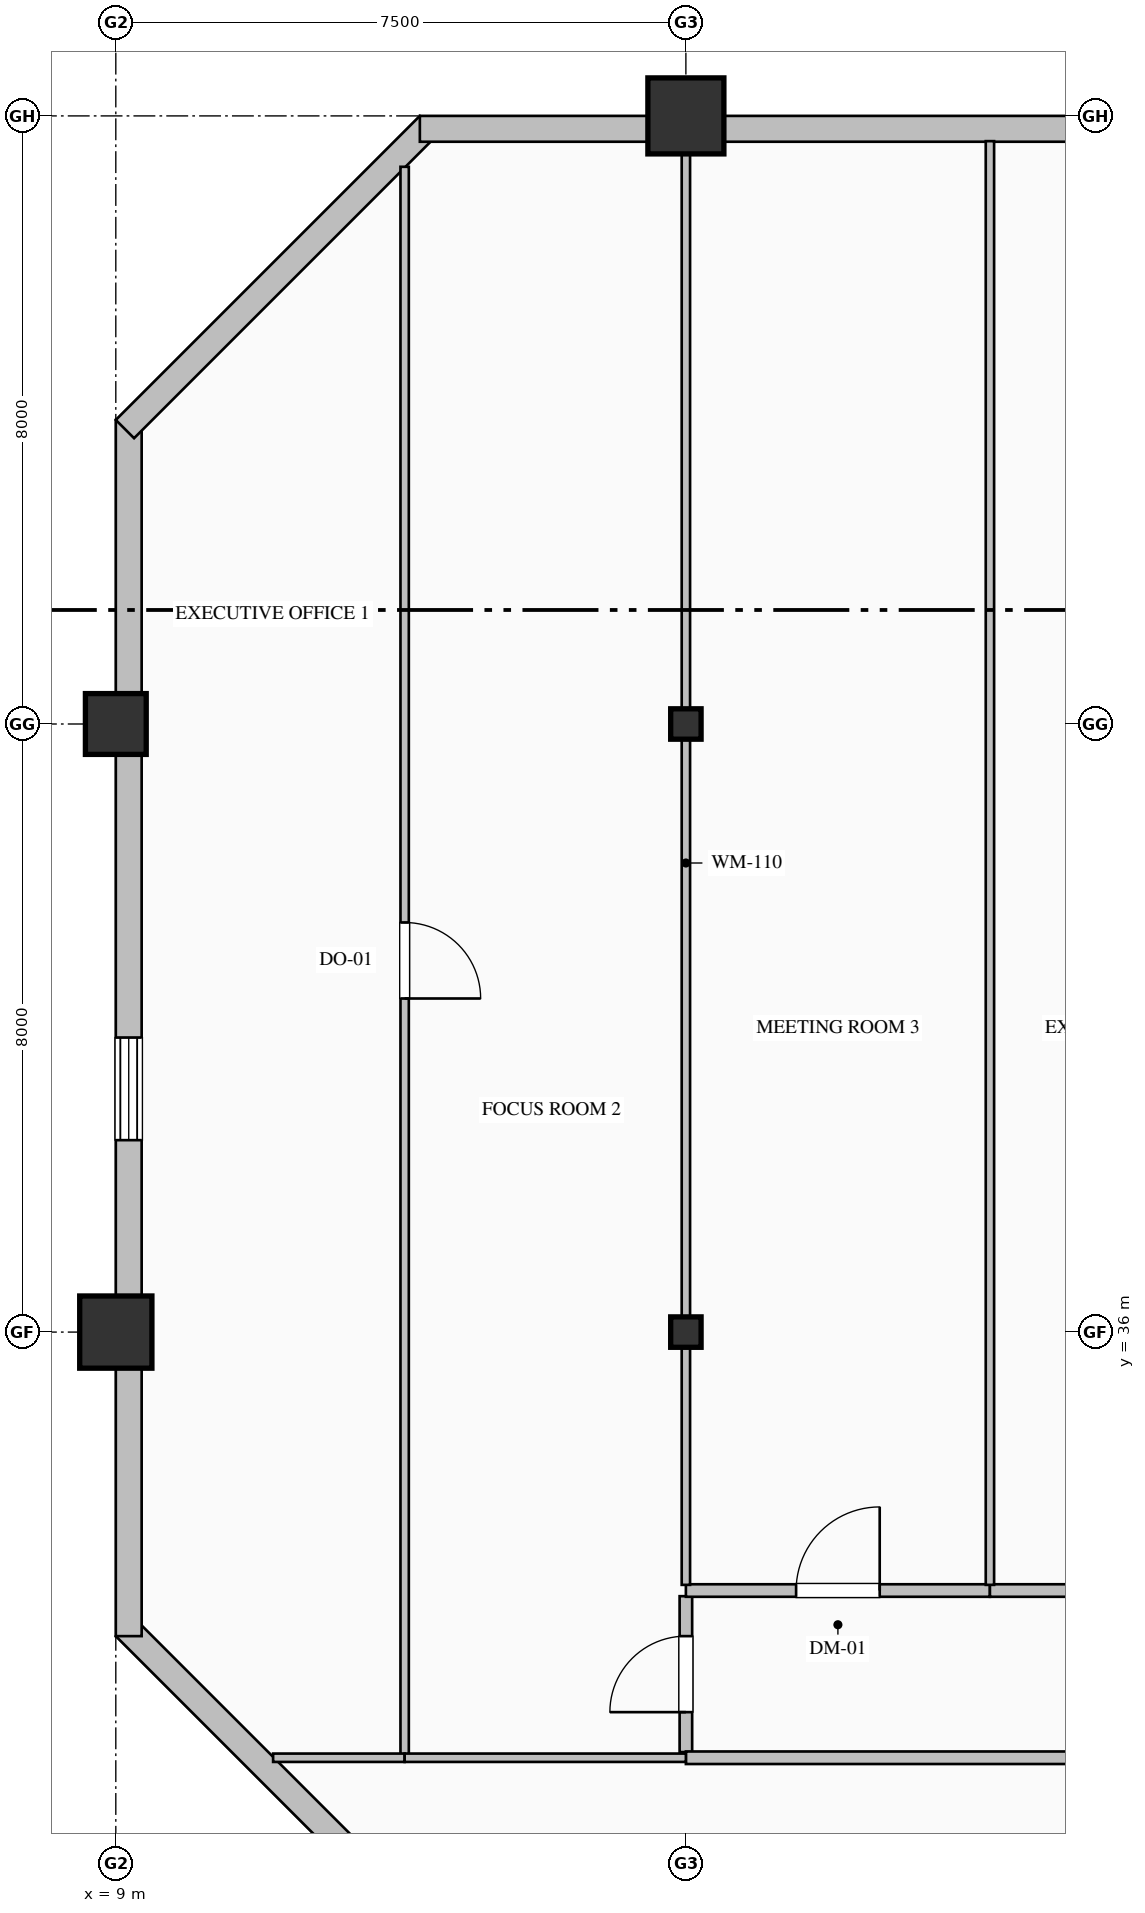
"""IFC4 building model, lengths in metres.
Left out: names, types, materials, properties, quantities, classifications, styles, units other than length and angle.
Written with IfcOpenShell. Run it as: python <this file> out.ifc"""

import sys

from ifc_helpers import new_model, si_unit, direction, frame, frame_2d, origin, origin_2d, place, context, subcontext, project, spatial, rectangle, hollow_rectangle, hollow_circle, i_section, extrude, element, fill, save


model = new_model("IFC4")
c1 = context("Model", 3, precision=1e-05, world=origin(), true_north=direction((0.0, 1.0)))
c2 = subcontext(c1, "Body", "Model", "MODEL_VIEW")
j1 = project(units=[si_unit("LENGTHUNIT", "METRE"), si_unit("PLANEANGLEUNIT", "RADIAN")], contexts=[c1])
p1 = place(None, origin())
s1 = spatial("IfcSite", under=j1, at=p1, CompositionType="ELEMENT")
p2 = place(p1, origin())
s2 = spatial("IfcBuilding", under=s1, at=p2, CompositionType="ELEMENT")
p3 = place(p2, frame((0.0, 0.0, 213.8)))
s3 = spatial("IfcBuildingStorey", under=s2, at=p3, CompositionType="ELEMENT", Elevation=213.8)
p4 = place(p3, frame((9.0, 36.0, 0.0), z_axis=(0.0, 0.0, 1.0), x_axis=(1.0, 0.0, 0.0)))
e1 = element("IfcColumn", 1, at=p4, inside=s3, PredefinedType="COLUMN", context=c2, shape_type="SweptSolid", body=[
    extrude(hollow_rectangle(XDim=0.95, YDim=0.95, WallThickness=0.036, at=origin_2d()), origin(), (0.0, 0.0, 1.0), 4.0),
])
p5 = place(p3, frame((9.0, 44.0, 0.0), z_axis=(0.0, 0.0, 1.0), x_axis=(1.0, 0.0, 0.0)))
e2 = element("IfcColumn", 2, at=p5, inside=s3, PredefinedType="COLUMN", context=c2, shape_type="SweptSolid", body=[
    extrude(hollow_rectangle(XDim=0.8, YDim=0.8, WallThickness=0.032, at=origin_2d()), origin(), (0.0, 0.0, 1.0), 4.0),
])
for number, where, z_axis, x_axis in (
    (3, (16.5, 36.0, 0.0), (0.0, 0.0, 1.0), (1.0, 0.0, 0.0)),
    (4, (16.5, 44.0, 0.0), (0.0, 0.0, 1.0), (1.0, 0.0, 0.0)),
):
    element("IfcColumn", number, at=place(p3, frame(where, z_axis=z_axis, x_axis=x_axis)), inside=s3, PredefinedType="COLUMN", context=c2, shape_type="SweptSolid", body=[
        extrude(i_section(OverallWidth=0.4, OverallDepth=0.4, WebThickness=0.013, FlangeThickness=0.021, FilletRadius=0.022, at=origin_2d()), origin(), (0.0, 0.0, 1.0), 4.0),
    ])
p6 = place(p3, frame((16.5, 52.0, 0.0), z_axis=(0.0, 0.0, 1.0), x_axis=(1.0, 0.0, 0.0)))
e5 = element("IfcColumn", 5, at=p6, inside=s3, PredefinedType="COLUMN", context=c2, shape_type="SweptSolid", body=[
    extrude(hollow_circle(Radius=0.5, WallThickness=0.036, at=origin_2d()), origin(), (0.0, 0.0, 1.0), 4.0),
])
p7 = place(p3, frame((13.12, 28.12, 0.0), z_axis=(0.0, 0.0, 1.0), x_axis=(-0.707106781187, 0.707106781187, 0.0)))
e6 = element("IfcWall", 6, at=p7, inside=s3, PredefinedType="SOLIDWALL", context=c2, shape_type="SweptSolid", body=[
    extrude(rectangle(XDim=5.657, YDim=0.34, at=frame_2d((2.828, 0.0))), origin(), (0.0, 0.0, 1.0), 3.775),
])
p8 = place(p3, frame((9.17, 32.0, 0.0), z_axis=(0.0, 0.0, 1.0), x_axis=(0.0, 1.0, 0.0)))
e7 = element("IfcWall", 7, at=p8, inside=s3, PredefinedType="SOLIDWALL", context=c2, shape_type="SweptSolid", body=[
    extrude(rectangle(XDim=16.0, YDim=0.34, at=frame_2d((8.0, 0.0))), origin(), (0.0, 0.0, 1.0), 3.325),
])
p9 = place(p8, frame((6.525, 0.0, 0.9)))
e8 = element("IfcOpeningElement", 8, at=p9, cuts=e7, PredefinedType="OPENING", context=c2, shape_type="SweptSolid", body=[
    extrude(rectangle(XDim=1.35, YDim=1.85, at=frame_2d((0.675, 0.925))), frame((0.0, 0.18, 0.0), z_axis=(0.0, -1.0, 0.0), x_axis=(1.0, 0.0, 0.0)), (0.0, 0.0, 1.0), 0.36),
])
p10 = place(p3, frame((9.12, 47.88, 0.0), z_axis=(0.0, 0.0, 1.0), x_axis=(0.707106781187, 0.707106781187, 0.0)))
e9 = element("IfcWall", 9, at=p10, inside=s3, PredefinedType="SOLIDWALL", context=c2, shape_type="SweptSolid", body=[
    extrude(rectangle(XDim=5.657, YDim=0.34, at=frame_2d((2.828, 0.0))), origin(), (0.0, 0.0, 1.0), 3.775),
])
p11 = place(p3, frame((13.0, 51.83, 0.0), z_axis=(0.0, 0.0, 1.0), x_axis=(1.0, 0.0, 0.0)))
e10 = element("IfcWall", 10, at=p11, inside=s3, PredefinedType="SOLIDWALL", context=c2, shape_type="SweptSolid", body=[
    extrude(rectangle(XDim=27.52, YDim=0.34, at=frame_2d((13.76, 0.0))), origin(), (0.0, 0.0, 1.0), 3.325),
])
p12 = place(p11, frame((17.4, 0.0, 0.9)))
e11 = element("IfcOpeningElement", 11, at=p12, cuts=e10, PredefinedType="OPENING", context=c2, shape_type="SweptSolid", body=[
    extrude(rectangle(XDim=1.2, YDim=1.85, at=frame_2d((0.6, 0.925))), frame((0.0, 0.18, 0.0), z_axis=(0.0, -1.0, 0.0), x_axis=(1.0, 0.0, 0.0)), (0.0, 0.0, 1.0), 0.36),
])
p13 = place(p3, frame((16.5, 30.475, 0.0), z_axis=(0.0, 0.0, 1.0), x_axis=(0.0, 1.0, 0.0)))
e12 = element("IfcWall", 12, at=p13, inside=s3, PredefinedType="PARTITIONING", context=c2, shape_type="SweptSolid", body=[
    extrude(rectangle(XDim=2.051, YDim=0.165, at=frame_2d((1.025, 0.0))), origin(), (0.0, 0.0, 1.0), 3.179),
])
p14 = place(p13, frame((0.525, 0.0, 0.0)))
e13 = element("IfcOpeningElement", 13, at=p14, cuts=e12, PredefinedType="OPENING", context=c2, shape_type="SweptSolid", body=[
    extrude(rectangle(XDim=1.0, YDim=2.15, at=frame_2d((0.5, 1.075))), frame((0.0, 0.093, 0.0), z_axis=(0.0, -1.0, 0.0), x_axis=(1.0, 0.0, 0.0)), (0.0, 0.0, 1.0), 0.185),
])
p15 = place(p3, frame((16.5, 32.6, 0.0), z_axis=(0.0, 0.0, 1.0), x_axis=(1.0, 0.0, 0.0)))
e14 = element("IfcWall", 14, at=p15, inside=s3, PredefinedType="PARTITIONING", context=c2, shape_type="SweptSolid", body=[
    extrude(rectangle(XDim=4.0, YDim=0.165, at=frame_2d((2.0, 0.0))), origin(), (0.0, 0.0, 1.0), 3.775),
])
p16 = place(p15, frame((1.45, 0.0, 0.0)))
e15 = element("IfcOpeningElement", 15, at=p16, cuts=e14, PredefinedType="OPENING", context=c2, shape_type="SweptSolid", body=[
    extrude(rectangle(XDim=1.1, YDim=2.2, at=frame_2d((0.55, 1.1))), frame((0.0, 0.093, 0.0), z_axis=(0.0, -1.0, 0.0), x_axis=(1.0, 0.0, 0.0)), (0.0, 0.0, 1.0), 0.185),
])
p17 = place(p3, frame((20.5, 32.6, 0.0), z_axis=(0.0, 0.0, 1.0), x_axis=(1.0, 0.0, 0.0)))
e16 = element("IfcWall", 16, at=p17, inside=s3, PredefinedType="PARTITIONING", context=c2, shape_type="SweptSolid", body=[
    extrude(rectangle(XDim=4.0, YDim=0.165, at=frame_2d((2.0, 0.0))), origin(), (0.0, 0.0, 1.0), 3.775),
])
p18 = place(p17, frame((1.5, 0.0, 0.0)))
e17 = element("IfcOpeningElement", 17, at=p18, cuts=e16, PredefinedType="OPENING", context=c2, shape_type="SweptSolid", body=[
    extrude(rectangle(XDim=1.0, YDim=2.15, at=frame_2d((0.5, 1.075))), frame((0.0, 0.093, 0.0), z_axis=(0.0, -1.0, 0.0), x_axis=(1.0, 0.0, 0.0)), (0.0, 0.0, 1.0), 0.185),
])
p19 = place(p3, frame((37.8, 30.4, 0.0), z_axis=(0.0, 0.0, 1.0), x_axis=(-1.0, 0.0, 0.0)))
e18 = element("IfcWall", 18, at=p19, inside=s3, PredefinedType="PARTITIONING", context=c2, shape_type="SweptSolid", body=[
    extrude(rectangle(XDim=21.3, YDim=0.165, at=frame_2d((10.65, 0.0))), origin(), (0.0, 0.0, 1.0), 3.775),
])
p20 = place(p19, frame((10.15, 0.0, 0.0)))
e19 = element("IfcOpeningElement", 19, at=p20, cuts=e18, PredefinedType="OPENING", context=c2, shape_type="SweptSolid", body=[
    extrude(rectangle(XDim=1.0, YDim=2.15, at=frame_2d((0.5, 1.075))), frame((0.0, 0.093, 0.0), z_axis=(0.0, -1.0, 0.0), x_axis=(1.0, 0.0, 0.0)), (0.0, 0.0, 1.0), 0.185),
])
p21 = place(p3, frame((12.8, 51.331, 0.0), z_axis=(0.0, 0.0, 1.0), x_axis=(0.0, -1.0, 0.0)))
e20 = element("IfcWall", 20, at=p21, inside=s3, PredefinedType="MOVABLE", context=c2, shape_type="SweptSolid", body=[
    extrude(rectangle(XDim=20.884, YDim=0.11, at=frame_2d((10.442, 0.0))), origin(), (0.0, 0.0, 1.0), 3.775),
])
p22 = place(p21, frame((9.942, 0.0, 0.0)))
e21 = element("IfcOpeningElement", 21, at=p22, cuts=e20, PredefinedType="OPENING", context=c2, shape_type="SweptSolid", body=[
    extrude(rectangle(XDim=1.0, YDim=2.15, at=frame_2d((0.5, 1.075))), frame((0.0, 0.065, 0.0), z_axis=(0.0, -1.0, 0.0), x_axis=(1.0, 0.0, 0.0)), (0.0, 0.0, 1.0), 0.13),
])
p23 = place(p3, frame((12.8, 30.4, 0.0), z_axis=(0.0, 0.0, 1.0), x_axis=(-1.0, 0.0, 0.0)))
e22 = element("IfcWall", 22, at=p23, inside=s3, PredefinedType="MOVABLE", context=c2, shape_type="SweptSolid", body=[
    extrude(rectangle(XDim=1.73, YDim=0.11, at=frame_2d((0.865, 0.0))), origin(), (0.0, 0.0, 1.0), 3.775),
])
p24 = place(p3, frame((16.5, 51.668, 0.0), z_axis=(0.0, 0.0, 1.0), x_axis=(0.0, -1.0, 0.0)))
e23 = element("IfcWall", 23, at=p24, inside=s3, PredefinedType="MOVABLE", context=c2, shape_type="SweptSolid", body=[
    extrude(rectangle(XDim=18.993, YDim=0.11, at=frame_2d((9.497, 0.0))), origin(), (0.0, 0.0, 1.0), 3.179),
])
p25 = place(p3, frame((16.5, 30.4, 0.0), z_axis=(0.0, 0.0, 1.0), x_axis=(-1.0, 0.0, 0.0)))
e24 = element("IfcWall", 24, at=p25, inside=s3, PredefinedType="MOVABLE", context=c2, shape_type="SweptSolid", body=[
    extrude(rectangle(XDim=3.7, YDim=0.11, at=frame_2d((1.85, 0.0))), origin(), (0.0, 0.0, 1.0), 3.775),
])
p26 = place(p3, frame((20.5, 51.668, 0.0), z_axis=(0.0, 0.0, 1.0), x_axis=(0.0, -1.0, 0.0)))
e25 = element("IfcWall", 25, at=p26, inside=s3, PredefinedType="MOVABLE", context=c2, shape_type="SweptSolid", body=[
    extrude(rectangle(XDim=18.993, YDim=0.11, at=frame_2d((9.497, 0.0))), origin(), (0.0, 0.0, 1.0), 3.775),
])
p27 = place(p9, origin())
e26 = element("IfcWindow", 26, at=p27, inside=s3, PartitioningType="DOUBLE_PANEL_VERTICAL", PredefinedType="WINDOW", context=c2, shape_type="SweptSolid", body=[
    extrude(rectangle(XDim=1.35, YDim=1.85, at=frame_2d((0.675, 0.925))), frame((0.0, 0.15, 0.0), z_axis=(0.0, -1.0, 0.0), x_axis=(1.0, 0.0, 0.0)), (0.0, 0.0, 1.0), 0.06),
])
fill(e8, e26)
p28 = place(p22, origin())
e27 = element("IfcDoor", 27, at=p28, inside=s3, OperationType="SINGLE_SWING_RIGHT", PredefinedType="DOOR", context=c2, shape_type="SweptSolid", body=[
    extrude(rectangle(XDim=1.0, YDim=2.15, at=frame_2d((0.5, 1.075))), frame((0.0, 0.025, 0.0), z_axis=(0.0, -1.0, 0.0), x_axis=(1.0, 0.0, 0.0)), (0.0, 0.0, 1.0), 0.05),
])
fill(e21, e27)
p29 = place(p14, origin())
e28 = element("IfcDoor", 28, at=p29, inside=s3, OperationType="SINGLE_SWING_LEFT", PredefinedType="DOOR", context=c2, shape_type="SweptSolid", body=[
    extrude(rectangle(XDim=1.0, YDim=2.15, at=frame_2d((0.5, 1.075))), frame((0.0, 0.025, 0.0), z_axis=(0.0, -1.0, 0.0), x_axis=(1.0, 0.0, 0.0)), (0.0, 0.0, 1.0), 0.05),
])
fill(e13, e28)
p30 = place(p16, origin())
e29 = element("IfcDoor", 29, at=p30, inside=s3, OperationType="SINGLE_SWING_RIGHT", PredefinedType="DOOR", context=c2, shape_type="SweptSolid", body=[
    extrude(rectangle(XDim=1.1, YDim=2.2, at=frame_2d((0.55, 1.1))), frame((0.0, 0.025, 0.0), z_axis=(0.0, -1.0, 0.0), x_axis=(1.0, 0.0, 0.0)), (0.0, 0.0, 1.0), 0.05),
])
fill(e15, e29)
save(model, sys.argv[1])
